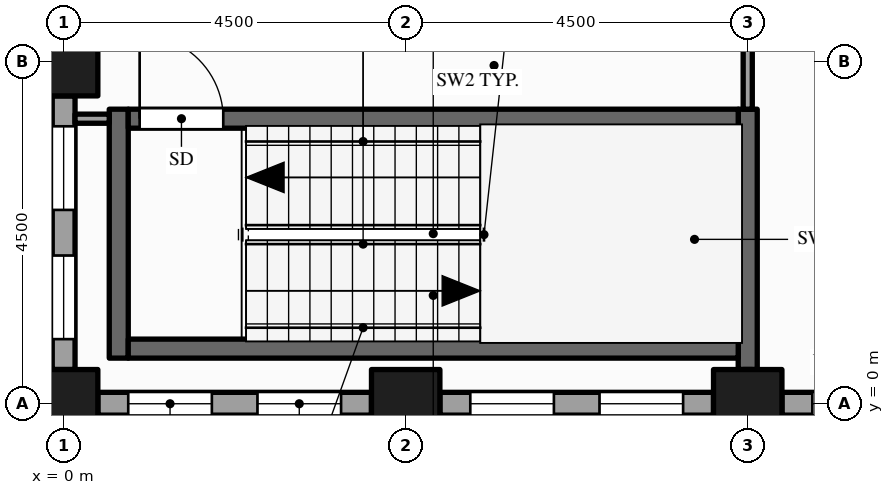
"""IFC4 building model, lengths in metres.
Left out: names, types, materials, properties, quantities, classifications, styles, units other than length and angle.
Written with IfcOpenShell. Run it as: python <this file> out.ifc"""

import sys

from ifc_helpers import new_model, si_unit, direction, frame, frame_2d, origin, origin_2d, place, context, subcontext, project, spatial, rectangle, hollow_rectangle, extrude, element, fill, save


model = new_model("IFC4")
c1 = context("Model", 3, precision=1e-05, world=origin(), true_north=direction((0.0, 1.0)))
c2 = subcontext(c1, "Body", "Model", "MODEL_VIEW")
j1 = project(units=[si_unit("LENGTHUNIT", "METRE"), si_unit("PLANEANGLEUNIT", "RADIAN")], contexts=[c1])
p1 = place(None, origin())
s1 = spatial("IfcSite", under=j1, at=p1, CompositionType="ELEMENT")
p2 = place(p1, origin())
s2 = spatial("IfcBuilding", under=s1, at=p2, CompositionType="ELEMENT")
p3 = place(p2, frame((0.0, 0.0, 159.0)))
s3 = spatial("IfcBuildingStorey", under=s2, at=p3, CompositionType="ELEMENT", Elevation=159.0)
for number, where, z_axis, x_axis in (
    (1, (0.0, 0.0, -0.15), (0.0, 0.0, 1.0), (1.0, 0.0, 0.0)),
    (2, (0.0, 4.5, -0.15), (0.0, 0.0, 1.0), (1.0, 0.0, 0.0)),
    (3, (4.5, 0.0, -0.15), (0.0, 0.0, 1.0), (1.0, 0.0, 0.0)),
    (4, (9.0, 0.0, -0.15), (0.0, 0.0, 1.0), (1.0, 0.0, 0.0)),
):
    element("IfcColumn", number, at=place(p3, frame(where, z_axis=z_axis, x_axis=x_axis)), inside=s3, PredefinedType="COLUMN", context=c2, shape_type="SweptSolid", body=[
        extrude(hollow_rectangle(XDim=0.9, YDim=0.9, WallThickness=0.045, at=origin_2d()), origin(), (0.0, 0.0, 1.0), 4.0),
    ])
p4 = place(p3, frame((0.45, 0.0, 0.0), z_axis=(0.0, 0.0, 1.0), x_axis=(1.0, 0.0, 0.0)))
e5 = element("IfcWall", 5, at=p4, inside=s3, PredefinedType="STANDARD", context=c2, shape_type="SweptSolid", body=[
    extrude(rectangle(XDim=3.6, YDim=0.3, at=frame_2d((1.8, 0.0))), origin(), (0.0, 0.0, 1.0), 3.149),
])
p5 = place(p4, frame((0.4, 0.0, 0.9)))
e6 = element("IfcOpeningElement", 6, at=p5, cuts=e5, PredefinedType="OPENING", context=c2, shape_type="SweptSolid", body=[
    extrude(rectangle(XDim=1.1, YDim=2.0, at=frame_2d((0.55, 1.0))), frame((0.0, 0.16, 0.0), z_axis=(0.0, -1.0, 0.0), x_axis=(1.0, 0.0, 0.0)), (0.0, 0.0, 1.0), 0.32),
])
p6 = place(p4, frame((2.1, 0.0, 0.9)))
e7 = element("IfcOpeningElement", 7, at=p6, cuts=e5, PredefinedType="OPENING", context=c2, shape_type="SweptSolid", body=[
    extrude(rectangle(XDim=1.1, YDim=2.0, at=frame_2d((0.55, 1.0))), frame((0.0, 0.16, 0.0), z_axis=(0.0, -1.0, 0.0), x_axis=(1.0, 0.0, 0.0)), (0.0, 0.0, 1.0), 0.32),
])
p7 = place(p3, frame((4.95, 0.0, 0.0), z_axis=(0.0, 0.0, 1.0), x_axis=(1.0, 0.0, 0.0)))
e8 = element("IfcWall", 8, at=p7, inside=s3, PredefinedType="STANDARD", context=c2, shape_type="SweptSolid", body=[
    extrude(rectangle(XDim=3.6, YDim=0.3, at=frame_2d((1.8, 0.0))), origin(), (0.0, 0.0, 1.0), 3.149),
])
p8 = place(p7, frame((0.4, 0.0, 0.9)))
e9 = element("IfcOpeningElement", 9, at=p8, cuts=e8, PredefinedType="OPENING", context=c2, shape_type="SweptSolid", body=[
    extrude(rectangle(XDim=1.1, YDim=2.0, at=frame_2d((0.55, 1.0))), frame((0.0, 0.16, 0.0), z_axis=(0.0, -1.0, 0.0), x_axis=(1.0, 0.0, 0.0)), (0.0, 0.0, 1.0), 0.32),
])
p9 = place(p7, frame((2.1, 0.0, 0.9)))
e10 = element("IfcOpeningElement", 10, at=p9, cuts=e8, PredefinedType="OPENING", context=c2, shape_type="SweptSolid", body=[
    extrude(rectangle(XDim=1.1, YDim=2.0, at=frame_2d((0.55, 1.0))), frame((0.0, 0.16, 0.0), z_axis=(0.0, -1.0, 0.0), x_axis=(1.0, 0.0, 0.0)), (0.0, 0.0, 1.0), 0.32),
])
p10 = place(p3, frame((9.45, 0.0, 0.0), z_axis=(0.0, 0.0, 1.0), x_axis=(1.0, 0.0, 0.0)))
e11 = element("IfcWall", 11, at=p10, inside=s3, PredefinedType="STANDARD", context=c2, shape_type="SweptSolid", body=[
    extrude(rectangle(XDim=3.6, YDim=0.3, at=frame_2d((1.8, 0.0))), origin(), (0.0, 0.0, 1.0), 2.87),
])
p11 = place(p10, frame((0.4, 0.0, 0.9)))
e12 = element("IfcOpeningElement", 12, at=p11, cuts=e11, PredefinedType="OPENING", context=c2, shape_type="SweptSolid", body=[
    extrude(rectangle(XDim=1.1, YDim=1.75, at=frame_2d((0.55, 0.875))), frame((0.0, 0.16, 0.0), z_axis=(0.0, -1.0, 0.0), x_axis=(1.0, 0.0, 0.0)), (0.0, 0.0, 1.0), 0.32),
])
p12 = place(p10, frame((2.1, 0.0, 0.9)))
e13 = element("IfcOpeningElement", 13, at=p12, cuts=e11, PredefinedType="OPENING", context=c2, shape_type="SweptSolid", body=[
    extrude(rectangle(XDim=1.1, YDim=1.75, at=frame_2d((0.55, 0.875))), frame((0.0, 0.16, 0.0), z_axis=(0.0, -1.0, 0.0), x_axis=(1.0, 0.0, 0.0)), (0.0, 0.0, 1.0), 0.32),
])
p13 = place(p3, frame((0.0, 4.05, 0.0), z_axis=(0.0, 0.0, 1.0), x_axis=(0.0, -1.0, 0.0)))
e14 = element("IfcWall", 14, at=p13, inside=s3, PredefinedType="STANDARD", context=c2, shape_type="SweptSolid", body=[
    extrude(rectangle(XDim=3.6, YDim=0.3, at=frame_2d((1.8, 0.0))), origin(), (0.0, 0.0, 1.0), 3.149),
])
p14 = place(p13, frame((0.4, 0.0, 0.9)))
e15 = element("IfcOpeningElement", 15, at=p14, cuts=e14, PredefinedType="OPENING", context=c2, shape_type="SweptSolid", body=[
    extrude(rectangle(XDim=1.1, YDim=2.0, at=frame_2d((0.55, 1.0))), frame((0.0, 0.16, 0.0), z_axis=(0.0, -1.0, 0.0), x_axis=(1.0, 0.0, 0.0)), (0.0, 0.0, 1.0), 0.32),
])
p15 = place(p13, frame((2.1, 0.0, 0.9)))
e16 = element("IfcOpeningElement", 16, at=p15, cuts=e14, PredefinedType="OPENING", context=c2, shape_type="SweptSolid", body=[
    extrude(rectangle(XDim=1.1, YDim=2.0, at=frame_2d((0.55, 1.0))), frame((0.0, 0.16, 0.0), z_axis=(0.0, -1.0, 0.0), x_axis=(1.0, 0.0, 0.0)), (0.0, 0.0, 1.0), 0.32),
])
p16 = place(p3, frame((0.725, 0.6, 0.0), z_axis=(0.0, 0.0, 1.0), x_axis=(0.0, 1.0, 0.0)))
e17 = element("IfcWall", 17, at=p16, inside=s3, PredefinedType="SHEAR", context=c2, shape_type="SweptSolid", body=[
    extrude(rectangle(XDim=3.275, YDim=0.25, at=frame_2d((1.637, 0.0))), origin(), (0.0, 0.0, 1.0), 3.85),
])
p17 = place(p3, frame((9.0, 0.15, 0.0), z_axis=(0.0, 0.0, 1.0), x_axis=(0.0, 1.0, 0.0)))
e18 = element("IfcWall", 18, at=p17, inside=s3, PredefinedType="PARTITIONING", context=c2, shape_type="SweptSolid", body=[
    extrude(rectangle(XDim=0.3, YDim=0.12, at=frame_2d((0.15, 0.0))), origin(), (0.0, 0.0, 1.0), 3.85),
])
p18 = place(p3, frame((9.0, 0.45, 0.0), z_axis=(0.0, 0.0, 1.0), x_axis=(0.0, 1.0, 0.0)))
e19 = element("IfcWall", 19, at=p18, inside=s3, PredefinedType="SHEAR", context=c2, shape_type="SweptSolid", body=[
    extrude(rectangle(XDim=3.425, YDim=0.25, at=frame_2d((1.712, 0.0))), origin(), (0.0, 0.0, 1.0), 3.85),
])
p19 = place(p3, frame((9.0, 3.875, 0.0), z_axis=(0.0, 0.0, 1.0), x_axis=(0.0, 1.0, 0.0)))
e20 = element("IfcWall", 20, at=p19, inside=s3, PredefinedType="PARTITIONING", context=c2, shape_type="SweptSolid", body=[
    extrude(rectangle(XDim=5.425, YDim=0.12, at=frame_2d((2.712, 0.0))), origin(), (0.0, 0.0, 1.0), 2.87),
])
p20 = place(p3, frame((0.85, 0.725, 0.0), z_axis=(0.0, 0.0, 1.0), x_axis=(1.0, 0.0, 0.0)))
e21 = element("IfcWall", 21, at=p20, inside=s3, PredefinedType="SHEAR", context=c2, shape_type="SweptSolid", body=[
    extrude(rectangle(XDim=8.025, YDim=0.25, at=frame_2d((4.012, 0.0))), origin(), (0.0, 0.0, 1.0), 3.85),
])
p21 = place(p3, frame((0.15, 3.75, 0.0), z_axis=(0.0, 0.0, 1.0), x_axis=(1.0, 0.0, 0.0)))
e22 = element("IfcWall", 22, at=p21, inside=s3, PredefinedType="PARTITIONING", context=c2, shape_type="SweptSolid", body=[
    extrude(rectangle(XDim=0.45, YDim=0.12, at=frame_2d((0.225, 0.0))), origin(), (0.0, 0.0, 1.0), 3.85),
])
p22 = place(p3, frame((0.85, 3.75, 0.0), z_axis=(0.0, 0.0, 1.0), x_axis=(1.0, 0.0, 0.0)))
e23 = element("IfcWall", 23, at=p22, inside=s3, PredefinedType="SHEAR", context=c2, shape_type="SweptSolid", body=[
    extrude(rectangle(XDim=8.025, YDim=0.25, at=frame_2d((4.012, 0.0))), origin(), (0.0, 0.0, 1.0), 3.85),
])
p23 = place(p22, frame((0.15, 0.0, 0.0)))
e24 = element("IfcOpeningElement", 24, at=p23, cuts=e23, PredefinedType="OPENING", context=c2, shape_type="SweptSolid", body=[
    extrude(rectangle(XDim=1.1, YDim=2.1, at=frame_2d((0.55, 1.05))), frame((0.0, 0.135, 0.0), z_axis=(0.0, -1.0, 0.0), x_axis=(1.0, 0.0, 0.0)), (0.0, 0.0, 1.0), 0.27),
])
p24 = place(p5, origin())
e25 = element("IfcWindow", 25, at=p24, inside=s3, PartitioningType="SINGLE_PANEL", PredefinedType="WINDOW", context=c2, shape_type="SweptSolid", body=[
    extrude(rectangle(XDim=1.1, YDim=2.0, at=frame_2d((0.55, 1.0))), frame((0.0, 0.03, 0.0), z_axis=(0.0, -1.0, 0.0), x_axis=(1.0, 0.0, 0.0)), (0.0, 0.0, 1.0), 0.06),
])
fill(e6, e25)
p25 = place(p6, origin())
e26 = element("IfcWindow", 26, at=p25, inside=s3, PartitioningType="SINGLE_PANEL", PredefinedType="WINDOW", context=c2, shape_type="SweptSolid", body=[
    extrude(rectangle(XDim=1.1, YDim=2.0, at=frame_2d((0.55, 1.0))), frame((0.0, 0.03, 0.0), z_axis=(0.0, -1.0, 0.0), x_axis=(1.0, 0.0, 0.0)), (0.0, 0.0, 1.0), 0.06),
])
fill(e7, e26)
p26 = place(p8, origin())
e27 = element("IfcWindow", 27, at=p26, inside=s3, PartitioningType="SINGLE_PANEL", PredefinedType="WINDOW", context=c2, shape_type="SweptSolid", body=[
    extrude(rectangle(XDim=1.1, YDim=2.0, at=frame_2d((0.55, 1.0))), frame((0.0, 0.03, 0.0), z_axis=(0.0, -1.0, 0.0), x_axis=(1.0, 0.0, 0.0)), (0.0, 0.0, 1.0), 0.06),
])
fill(e9, e27)
p27 = place(p9, origin())
e28 = element("IfcWindow", 28, at=p27, inside=s3, PartitioningType="SINGLE_PANEL", PredefinedType="WINDOW", context=c2, shape_type="SweptSolid", body=[
    extrude(rectangle(XDim=1.1, YDim=2.0, at=frame_2d((0.55, 1.0))), frame((0.0, 0.03, 0.0), z_axis=(0.0, -1.0, 0.0), x_axis=(1.0, 0.0, 0.0)), (0.0, 0.0, 1.0), 0.06),
])
fill(e10, e28)
p28 = place(p11, origin())
e29 = element("IfcWindow", 29, at=p28, inside=s3, PartitioningType="SINGLE_PANEL", PredefinedType="WINDOW", context=c2, shape_type="SweptSolid", body=[
    extrude(rectangle(XDim=1.1, YDim=1.75, at=frame_2d((0.55, 0.875))), frame((0.0, 0.03, 0.0), z_axis=(0.0, -1.0, 0.0), x_axis=(1.0, 0.0, 0.0)), (0.0, 0.0, 1.0), 0.06),
])
fill(e12, e29)
p29 = place(p14, origin())
e30 = element("IfcWindow", 30, at=p29, inside=s3, PartitioningType="SINGLE_PANEL", PredefinedType="WINDOW", context=c2, shape_type="SweptSolid", body=[
    extrude(rectangle(XDim=1.1, YDim=2.0, at=frame_2d((0.55, 1.0))), frame((0.0, 0.03, 0.0), z_axis=(0.0, -1.0, 0.0), x_axis=(1.0, 0.0, 0.0)), (0.0, 0.0, 1.0), 0.06),
])
fill(e15, e30)
p30 = place(p15, origin())
e31 = element("IfcWindow", 31, at=p30, inside=s3, PartitioningType="SINGLE_PANEL", PredefinedType="WINDOW", context=c2, shape_type="SweptSolid", body=[
    extrude(rectangle(XDim=1.1, YDim=2.0, at=frame_2d((0.55, 1.0))), frame((0.0, 0.03, 0.0), z_axis=(0.0, -1.0, 0.0), x_axis=(1.0, 0.0, 0.0)), (0.0, 0.0, 1.0), 0.06),
])
fill(e16, e31)
p31 = place(p23, origin())
e32 = element("IfcDoor", 32, at=p31, inside=s3, OperationType="SINGLE_SWING_LEFT", PredefinedType="DOOR", context=c2, shape_type="SweptSolid", body=[
    extrude(rectangle(XDim=1.1, YDim=2.1, at=frame_2d((0.55, 1.05))), frame((0.0, 0.025, 0.0), z_axis=(0.0, -1.0, 0.0), x_axis=(1.0, 0.0, 0.0)), (0.0, 0.0, 1.0), 0.05),
])
fill(e24, e32)
save(model, sys.argv[1])
